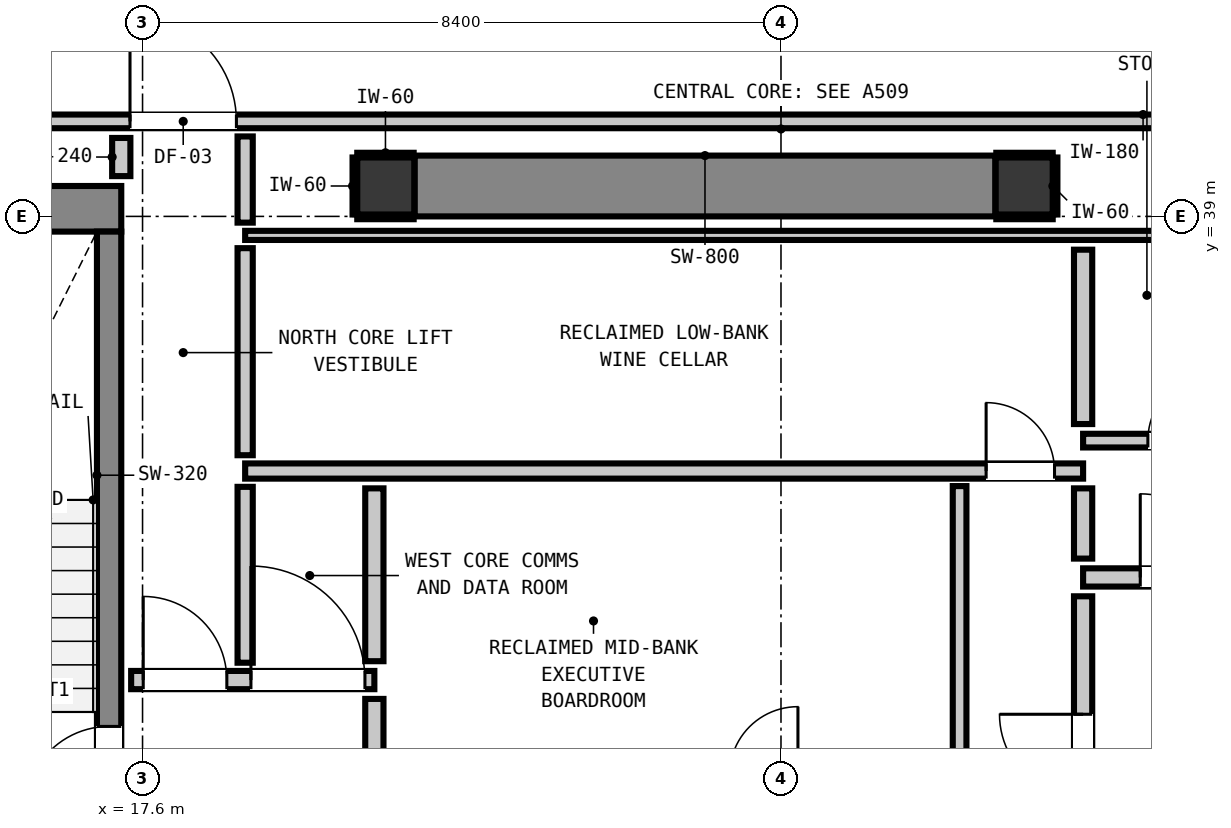
"""IFC4 building model, lengths in metres.
Left out: names, types, materials, properties, quantities, classifications, styles, units other than length and angle.
Written with IfcOpenShell. Run it as: python <this file> out.ifc"""

import sys

from ifc_helpers import new_model, si_unit, direction, frame, frame_2d, origin, origin_2d, place, context, subcontext, project, spatial, rectangle, extrude, element, fill, save


model = new_model("IFC4")
c1 = context("Model", 3, precision=1e-05, world=origin(), true_north=direction((0.0, 1.0)))
c2 = subcontext(c1, "Body", "Model", "MODEL_VIEW")
j1 = project(units=[si_unit("LENGTHUNIT", "METRE"), si_unit("PLANEANGLEUNIT", "RADIAN")], contexts=[c1])
p1 = place(None, origin())
s1 = spatial("IfcSite", under=j1, at=p1, CompositionType="ELEMENT")
p2 = place(p1, origin())
s2 = spatial("IfcBuilding", under=s1, at=p2, CompositionType="ELEMENT")
p3 = place(p2, frame((0.0, 0.0, 176.88)))
s3 = spatial("IfcBuildingStorey", under=s2, at=p3, CompositionType="ELEMENT", Elevation=176.88)
for number, where, z_axis, x_axis in (
    (1, (20.8, 39.4, 0.0), (0.0, 0.0, 1.0), (1.0, 0.0, 0.0)),
    (2, (29.2, 39.4, 0.0), (0.0, 0.0, 1.0), (1.0, 0.0, 0.0)),
):
    element("IfcColumn", number, at=place(p3, frame(where, z_axis=z_axis, x_axis=x_axis)), inside=s3, PredefinedType="COLUMN", context=c2, shape_type="SweptSolid", body=[
        extrude(rectangle(XDim=0.75, YDim=0.75, at=origin_2d()), origin(), (0.0, 0.0, 1.0), 3.32),
    ])
p4 = place(p3, frame((13.24, 39.1, 0.0), z_axis=(0.0, 0.0, 1.0), x_axis=(1.0, 0.0, 0.0)))
e3 = element("IfcWall", 3, at=p4, inside=s3, PredefinedType="SHEAR", context=c2, shape_type="SweptSolid", body=[
    extrude(rectangle(XDim=4.08, YDim=0.6, at=frame_2d((2.04, 0.0))), origin(), (0.0, 0.0, 1.0), 3.32),
])
p5 = place(p3, frame((21.18, 39.4, 0.0), z_axis=(0.0, 0.0, 1.0), x_axis=(1.0, 0.0, 0.0)))
e4 = element("IfcWall", 4, at=p5, inside=s3, PredefinedType="SHEAR", context=c2, shape_type="SweptSolid", body=[
    extrude(rectangle(XDim=7.64, YDim=0.8, at=frame_2d((3.82, 0.0))), origin(), (0.0, 0.0, 1.0), 3.32),
])
p6 = place(p3, frame((17.16, 31.0, 0.0), z_axis=(0.0, 0.0, 1.0), x_axis=(0.0, 1.0, 0.0)))
e5 = element("IfcWall", 5, at=p6, inside=s3, PredefinedType="SHEAR", context=c2, shape_type="SweptSolid", body=[
    extrude(rectangle(XDim=7.8, YDim=0.32, at=frame_2d((3.9, 0.0))), origin(), (0.0, 0.0, 1.0), 3.32),
])
p7 = place(p6, frame((0.19, 0.0, 0.0)))
e6 = element("IfcOpeningElement", 6, at=p7, cuts=e5, PredefinedType="OPENING", context=c2, shape_type="SweptSolid", body=[
    extrude(rectangle(XDim=1.1, YDim=2.15, at=frame_2d((0.55, 1.075))), frame((0.0, 0.17, 0.0), z_axis=(0.0, -1.0, 0.0), x_axis=(1.0, 0.0, 0.0)), (0.0, 0.0, 1.0), 0.34),
])
p8 = place(p3, frame((17.45, 32.9, 0.0), z_axis=(0.0, 0.0, 1.0), x_axis=(1.0, 0.0, 0.0)))
e7 = element("IfcWall", 7, at=p8, inside=s3, PredefinedType="PARTITIONING", context=c2, shape_type="SweptSolid", body=[
    extrude(rectangle(XDim=3.2, YDim=0.24, at=frame_2d((1.6, 0.0))), origin(), (0.0, 0.0, 1.0), 3.08),
])
p9 = place(p8, frame((0.159, 0.0, 0.0)))
e8 = element("IfcOpeningElement", 8, at=p9, cuts=e7, PredefinedType="OPENING", context=c2, shape_type="SweptSolid", body=[
    extrude(rectangle(XDim=1.1, YDim=2.15, at=frame_2d((0.55, 1.075))), frame((0.0, 0.13, 0.0), z_axis=(0.0, -1.0, 0.0), x_axis=(1.0, 0.0, 0.0)), (0.0, 0.0, 1.0), 0.26),
])
p10 = place(p8, frame((1.576, 0.0, 0.0)))
e9 = element("IfcOpeningElement", 9, at=p10, cuts=e7, PredefinedType="OPENING", context=c2, shape_type="SweptSolid", body=[
    extrude(rectangle(XDim=1.5, YDim=2.15, at=frame_2d((0.75, 1.075))), frame((0.0, 0.13, 0.0), z_axis=(0.0, -1.0, 0.0), x_axis=(1.0, 0.0, 0.0)), (0.0, 0.0, 1.0), 0.26),
])
p11 = place(p3, frame((29.975, 34.25, 0.0), z_axis=(0.0, 0.0, 1.0), x_axis=(1.0, 0.0, 0.0)))
e10 = element("IfcWall", 10, at=p11, inside=s3, PredefinedType="PARTITIONING", context=c2, shape_type="SweptSolid", body=[
    extrude(rectangle(XDim=2.475, YDim=0.24, at=frame_2d((1.237, 0.0))), origin(), (0.0, 0.0, 1.0), 3.08),
])
p12 = place(p11, frame((0.752, 0.0, 0.0)))
e11 = element("IfcOpeningElement", 11, at=p12, cuts=e10, PredefinedType="OPENING", context=c2, shape_type="SweptSolid", body=[
    extrude(rectangle(XDim=1.1, YDim=2.15, at=frame_2d((0.55, 1.075))), frame((0.0, 0.13, 0.0), z_axis=(0.0, -1.0, 0.0), x_axis=(1.0, 0.0, 0.0)), (0.0, 0.0, 1.0), 0.26),
])
p13 = place(p3, frame((18.95, 35.65, 0.0), z_axis=(0.0, 0.0, 1.0), x_axis=(1.0, 0.0, 0.0)))
e12 = element("IfcWall", 12, at=p13, inside=s3, PredefinedType="PARTITIONING", context=c2, shape_type="SweptSolid", body=[
    extrude(rectangle(XDim=11.025, YDim=0.2, at=frame_2d((5.513, 0.0))), origin(), (0.0, 0.0, 1.0), 3.08),
])
p14 = place(p13, frame((9.749, 0.0, 0.0)))
e13 = element("IfcOpeningElement", 13, at=p14, cuts=e12, PredefinedType="OPENING", context=c2, shape_type="SweptSolid", body=[
    extrude(rectangle(XDim=0.9, YDim=2.1, at=frame_2d((0.45, 1.05))), frame((0.0, 0.11, 0.0), z_axis=(0.0, -1.0, 0.0), x_axis=(1.0, 0.0, 0.0)), (0.0, 0.0, 1.0), 0.22),
])
p15 = place(p3, frame((29.975, 36.05, 0.0), z_axis=(0.0, 0.0, 1.0), x_axis=(1.0, 0.0, 0.0)))
e14 = element("IfcWall", 14, at=p15, inside=s3, PredefinedType="PARTITIONING", context=c2, shape_type="SweptSolid", body=[
    extrude(rectangle(XDim=2.505, YDim=0.18, at=frame_2d((1.252, 0.0))), origin(), (0.0, 0.0, 1.0), 3.08),
])
p16 = place(p15, frame((0.852, 0.0, 0.0)))
e15 = element("IfcOpeningElement", 15, at=p16, cuts=e14, PredefinedType="OPENING", context=c2, shape_type="SweptSolid", body=[
    extrude(rectangle(XDim=0.9, YDim=2.1, at=frame_2d((0.45, 1.05))), frame((0.0, 0.1, 0.0), z_axis=(0.0, -1.0, 0.0), x_axis=(1.0, 0.0, 0.0)), (0.0, 0.0, 1.0), 0.2),
])
p17 = place(p3, frame((3.207, 40.25, 0.0), z_axis=(0.0, 0.0, 1.0), x_axis=(1.0, 0.0, 0.0)))
e16 = element("IfcWall", 16, at=p17, inside=s3, PredefinedType="PARTITIONING", context=c2, shape_type="SweptSolid", body=[
    extrude(rectangle(XDim=39.386, YDim=0.18, at=frame_2d((19.693, 0.0))), origin(), (0.0, 0.0, 1.0), 3.08),
])
p18 = place(p17, frame((14.228, 0.0, 0.0)))
e17 = element("IfcOpeningElement", 17, at=p18, cuts=e16, PredefinedType="OPENING", context=c2, shape_type="SweptSolid", body=[
    extrude(rectangle(XDim=1.4, YDim=2.15, at=frame_2d((0.7, 1.075))), frame((0.0, 0.1, 0.0), z_axis=(0.0, -1.0, 0.0), x_axis=(1.0, 0.0, 0.0)), (0.0, 0.0, 1.0), 0.2),
])
p19 = place(p17, frame((7.243, 0.0, 0.0)))
e18 = element("IfcOpeningElement", 18, at=p19, cuts=e16, PredefinedType="OPENING", context=c2, shape_type="SweptSolid", body=[
    extrude(rectangle(XDim=1.4, YDim=2.15, at=frame_2d((0.7, 1.075))), frame((0.0, 0.1, 0.0), z_axis=(0.0, -1.0, 0.0), x_axis=(1.0, 0.0, 0.0)), (0.0, 0.0, 1.0), 0.2),
])
p20 = place(p17, frame((3.017, 0.0, 0.0)))
e19 = element("IfcOpeningElement", 19, at=p20, cuts=e16, PredefinedType="OPENING", context=c2, shape_type="SweptSolid", body=[
    extrude(rectangle(XDim=0.95, YDim=2.1, at=frame_2d((0.475, 1.05))), frame((0.0, 0.1, 0.0), z_axis=(0.0, -1.0, 0.0), x_axis=(1.0, 0.0, 0.0)), (0.0, 0.0, 1.0), 0.2),
])
p21 = place(p3, frame((18.95, 38.75, 0.0), z_axis=(0.0, 0.0, 1.0), x_axis=(1.0, 0.0, 0.0)))
e20 = element("IfcWall", 20, at=p21, inside=s3, PredefinedType="PARTITIONING", context=c2, shape_type="SweptSolid", body=[
    extrude(rectangle(XDim=13.56, YDim=0.12, at=frame_2d((6.78, 0.0))), origin(), (0.0, 0.0, 1.0), 3.08),
])
p22 = place(p3, frame((17.32, 39.53, 0.0), z_axis=(0.0, 0.0, 1.0), x_axis=(0.0, 1.0, 0.0)))
e21 = element("IfcWall", 21, at=p22, inside=s3, PredefinedType="PARTITIONING", context=c2, shape_type="SweptSolid", body=[
    extrude(rectangle(XDim=0.502, YDim=0.24, at=frame_2d((0.251, 0.0))), origin(), (0.0, 0.0, 1.0), 3.08),
])
p23 = place(p3, frame((20.65, 31.868, 0.0), z_axis=(0.0, 0.0, 1.0), x_axis=(0.0, 1.0, 0.0)))
e22 = element("IfcWall", 22, at=p23, inside=s3, PredefinedType="PARTITIONING", context=c2, shape_type="SweptSolid", body=[
    extrude(rectangle(XDim=0.784, YDim=0.24, at=frame_2d((0.392, 0.0))), origin(), (0.0, 0.0, 1.0), 2.315),
])
p24 = place(p3, frame((20.65, 33.148, 0.0), z_axis=(0.0, 0.0, 1.0), x_axis=(0.0, 1.0, 0.0)))
e23 = element("IfcWall", 23, at=p24, inside=s3, PredefinedType="PARTITIONING", context=c2, shape_type="SweptSolid", body=[
    extrude(rectangle(XDim=2.274, YDim=0.24, at=frame_2d((1.137, 0.0))), origin(), (0.0, 0.0, 1.0), 2.315),
])
p25 = place(p3, frame((29.975, 29.768, 0.0), z_axis=(0.0, 0.0, 1.0), x_axis=(0.0, 1.0, 0.0)))
e24 = element("IfcWall", 24, at=p25, inside=s3, PredefinedType="PARTITIONING", context=c2, shape_type="SweptSolid", body=[
    extrude(rectangle(XDim=4.234, YDim=0.24, at=frame_2d((2.117, 0.0))), origin(), (0.0, 0.0, 1.0), 3.08),
])
p26 = place(p25, frame((1.582, 0.0, 0.0)))
e25 = element("IfcOpeningElement", 25, at=p26, cuts=e24, PredefinedType="OPENING", context=c2, shape_type="SweptSolid", body=[
    extrude(rectangle(XDim=1.1, YDim=2.15, at=frame_2d((0.55, 1.075))), frame((0.0, 0.13, 0.0), z_axis=(0.0, -1.0, 0.0), x_axis=(1.0, 0.0, 0.0)), (0.0, 0.0, 1.0), 0.26),
])
p27 = place(p3, frame((29.975, 34.498, 0.0), z_axis=(0.0, 0.0, 1.0), x_axis=(0.0, 1.0, 0.0)))
e26 = element("IfcWall", 26, at=p27, inside=s3, PredefinedType="PARTITIONING", context=c2, shape_type="SweptSolid", body=[
    extrude(rectangle(XDim=0.924, YDim=0.24, at=frame_2d((0.462, 0.0))), origin(), (0.0, 0.0, 1.0), 3.08),
])
p28 = place(p3, frame((29.975, 36.268, 0.0), z_axis=(0.0, 0.0, 1.0), x_axis=(0.0, 1.0, 0.0)))
e27 = element("IfcWall", 27, at=p28, inside=s3, PredefinedType="PARTITIONING", context=c2, shape_type="SweptSolid", body=[
    extrude(rectangle(XDim=2.294, YDim=0.24, at=frame_2d((1.147, 0.0))), origin(), (0.0, 0.0, 1.0), 3.08),
])
p29 = place(p3, frame((18.95, 33.128, 0.0), z_axis=(0.0, 0.0, 1.0), x_axis=(0.0, 1.0, 0.0)))
e28 = element("IfcWall", 28, at=p29, inside=s3, PredefinedType="PARTITIONING", context=c2, shape_type="SweptSolid", body=[
    extrude(rectangle(XDim=2.314, YDim=0.2, at=frame_2d((1.157, 0.0))), origin(), (0.0, 0.0, 1.0), 3.08),
])
p30 = place(p3, frame((18.95, 35.858, 0.0), z_axis=(0.0, 0.0, 1.0), x_axis=(0.0, 1.0, 0.0)))
e29 = element("IfcWall", 29, at=p30, inside=s3, PredefinedType="PARTITIONING", context=c2, shape_type="SweptSolid", body=[
    extrude(rectangle(XDim=2.724, YDim=0.2, at=frame_2d((1.362, 0.0))), origin(), (0.0, 0.0, 1.0), 3.08),
])
p31 = place(p3, frame((18.95, 38.918, 0.0), z_axis=(0.0, 0.0, 1.0), x_axis=(0.0, 1.0, 0.0)))
e30 = element("IfcWall", 30, at=p31, inside=s3, PredefinedType="PARTITIONING", context=c2, shape_type="SweptSolid", body=[
    extrude(rectangle(XDim=1.134, YDim=0.2, at=frame_2d((0.567, 0.0))), origin(), (0.0, 0.0, 1.0), 3.08),
])
p32 = place(p3, frame((28.35, 31.838, 0.0), z_axis=(0.0, 0.0, 1.0), x_axis=(0.0, 1.0, 0.0)))
e31 = element("IfcWall", 31, at=p32, inside=s3, PredefinedType="PARTITIONING", context=c2, shape_type="SweptSolid", body=[
    extrude(rectangle(XDim=3.614, YDim=0.18, at=frame_2d((1.807, 0.0))), origin(), (0.0, 0.0, 1.0), 3.08),
])
for number, where, z_axis, x_axis in (
    (32, (20.425, 38.993, 0.0), (0.0, 0.0, 1.0), (1.0, 0.0, 0.0)),
    (33, (20.425, 39.807, 0.0), (0.0, 0.0, 1.0), (1.0, 0.0, 0.0)),
):
    element("IfcWall", number, at=place(p3, frame(where, z_axis=z_axis, x_axis=x_axis)), inside=s3, PredefinedType="PARTITIONING", context=c2, shape_type="SweptSolid", body=[
        extrude(rectangle(XDim=0.742, YDim=0.06, at=frame_2d((0.371, 0.0))), origin(), (0.0, 0.0, 1.0), 1.45),
    ])
p33 = place(p3, frame((20.393, 39.025, 0.0), z_axis=(0.0, 0.0, 1.0), x_axis=(0.0, 1.0, 0.0)))
e34 = element("IfcWall", 34, at=p33, inside=s3, PredefinedType="PARTITIONING", context=c2, shape_type="SweptSolid", body=[
    extrude(rectangle(XDim=0.75, YDim=0.06, at=frame_2d((0.375, 0.0))), origin(), (0.0, 0.0, 1.0), 1.45),
])
for number, where, z_axis, x_axis in (
    (35, (28.833, 38.993, 0.0), (0.0, 0.0, 1.0), (1.0, 0.0, 0.0)),
    (36, (28.833, 39.807, 0.0), (0.0, 0.0, 1.0), (1.0, 0.0, 0.0)),
):
    element("IfcWall", number, at=place(p3, frame(where, z_axis=z_axis, x_axis=x_axis)), inside=s3, PredefinedType="PARTITIONING", context=c2, shape_type="SweptSolid", body=[
        extrude(rectangle(XDim=0.742, YDim=0.06, at=frame_2d((0.371, 0.0))), origin(), (0.0, 0.0, 1.0), 1.45),
    ])
p34 = place(p3, frame((29.607, 39.025, 0.0), z_axis=(0.0, 0.0, 1.0), x_axis=(0.0, 1.0, 0.0)))
e37 = element("IfcWall", 37, at=p34, inside=s3, PredefinedType="PARTITIONING", context=c2, shape_type="SweptSolid", body=[
    extrude(rectangle(XDim=0.75, YDim=0.06, at=frame_2d((0.375, 0.0))), origin(), (0.0, 0.0, 1.0), 1.45),
])
p35 = place(p7, origin())
e38 = element("IfcDoor", 38, at=p35, inside=s3, OperationType="SINGLE_SWING_LEFT", PredefinedType="DOOR", context=c2, shape_type="SweptSolid", body=[
    extrude(rectangle(XDim=1.1, YDim=2.15, at=frame_2d((0.55, 1.075))), frame((0.0, 0.025, 0.0), z_axis=(0.0, -1.0, 0.0), x_axis=(1.0, 0.0, 0.0)), (0.0, 0.0, 1.0), 0.05),
])
fill(e6, e38)
p36 = place(p9, origin())
e39 = element("IfcDoor", 39, at=p36, inside=s3, OperationType="SINGLE_SWING_LEFT", PredefinedType="DOOR", context=c2, shape_type="SweptSolid", body=[
    extrude(rectangle(XDim=1.1, YDim=2.15, at=frame_2d((0.55, 1.075))), frame((0.0, 0.025, 0.0), z_axis=(0.0, -1.0, 0.0), x_axis=(1.0, 0.0, 0.0)), (0.0, 0.0, 1.0), 0.05),
])
fill(e8, e39)
p37 = place(p26, origin())
e40 = element("IfcDoor", 40, at=p37, inside=s3, OperationType="SINGLE_SWING_RIGHT", PredefinedType="DOOR", context=c2, shape_type="SweptSolid", body=[
    extrude(rectangle(XDim=1.1, YDim=2.15, at=frame_2d((0.55, 1.075))), frame((0.0, 0.025, 0.0), z_axis=(0.0, -1.0, 0.0), x_axis=(1.0, 0.0, 0.0)), (0.0, 0.0, 1.0), 0.05),
])
fill(e25, e40)
p38 = place(p12, origin())
e41 = element("IfcDoor", 41, at=p38, inside=s3, OperationType="SINGLE_SWING_LEFT", PredefinedType="DOOR", context=c2, shape_type="SweptSolid", body=[
    extrude(rectangle(XDim=1.1, YDim=2.15, at=frame_2d((0.55, 1.075))), frame((0.0, 0.025, 0.0), z_axis=(0.0, -1.0, 0.0), x_axis=(1.0, 0.0, 0.0)), (0.0, 0.0, 1.0), 0.05),
])
fill(e11, e41)
p39 = place(p18, origin())
e42 = element("IfcDoor", 42, at=p39, inside=s3, OperationType="SINGLE_SWING_LEFT", PredefinedType="DOOR", context=c2, shape_type="SweptSolid", body=[
    extrude(rectangle(XDim=1.4, YDim=2.15, at=frame_2d((0.7, 1.075))), frame((0.0, 0.025, 0.0), z_axis=(0.0, -1.0, 0.0), x_axis=(1.0, 0.0, 0.0)), (0.0, 0.0, 1.0), 0.05),
])
fill(e17, e42)
p40 = place(p10, origin())
e43 = element("IfcDoor", 43, at=p40, inside=s3, OperationType="SINGLE_SWING_LEFT", PredefinedType="DOOR", context=c2, shape_type="SweptSolid", body=[
    extrude(rectangle(XDim=1.5, YDim=2.15, at=frame_2d((0.75, 1.075))), frame((0.0, 0.025, 0.0), z_axis=(0.0, -1.0, 0.0), x_axis=(1.0, 0.0, 0.0)), (0.0, 0.0, 1.0), 0.05),
])
fill(e9, e43)
p41 = place(p16, origin())
e44 = element("IfcDoor", 44, at=p41, inside=s3, OperationType="SINGLE_SWING_RIGHT", PredefinedType="DOOR", context=c2, shape_type="SweptSolid", body=[
    extrude(rectangle(XDim=0.9, YDim=2.1, at=frame_2d((0.45, 1.05))), frame((0.0, 0.025, 0.0), z_axis=(0.0, -1.0, 0.0), x_axis=(1.0, 0.0, 0.0)), (0.0, 0.0, 1.0), 0.05),
])
fill(e15, e44)
p42 = place(p14, origin())
e45 = element("IfcDoor", 45, at=p42, inside=s3, OperationType="SINGLE_SWING_LEFT", PredefinedType="DOOR", context=c2, shape_type="SweptSolid", body=[
    extrude(rectangle(XDim=0.9, YDim=2.1, at=frame_2d((0.45, 1.05))), frame((0.0, 0.025, 0.0), z_axis=(0.0, -1.0, 0.0), x_axis=(1.0, 0.0, 0.0)), (0.0, 0.0, 1.0), 0.05),
])
fill(e13, e45)
save(model, sys.argv[1])
